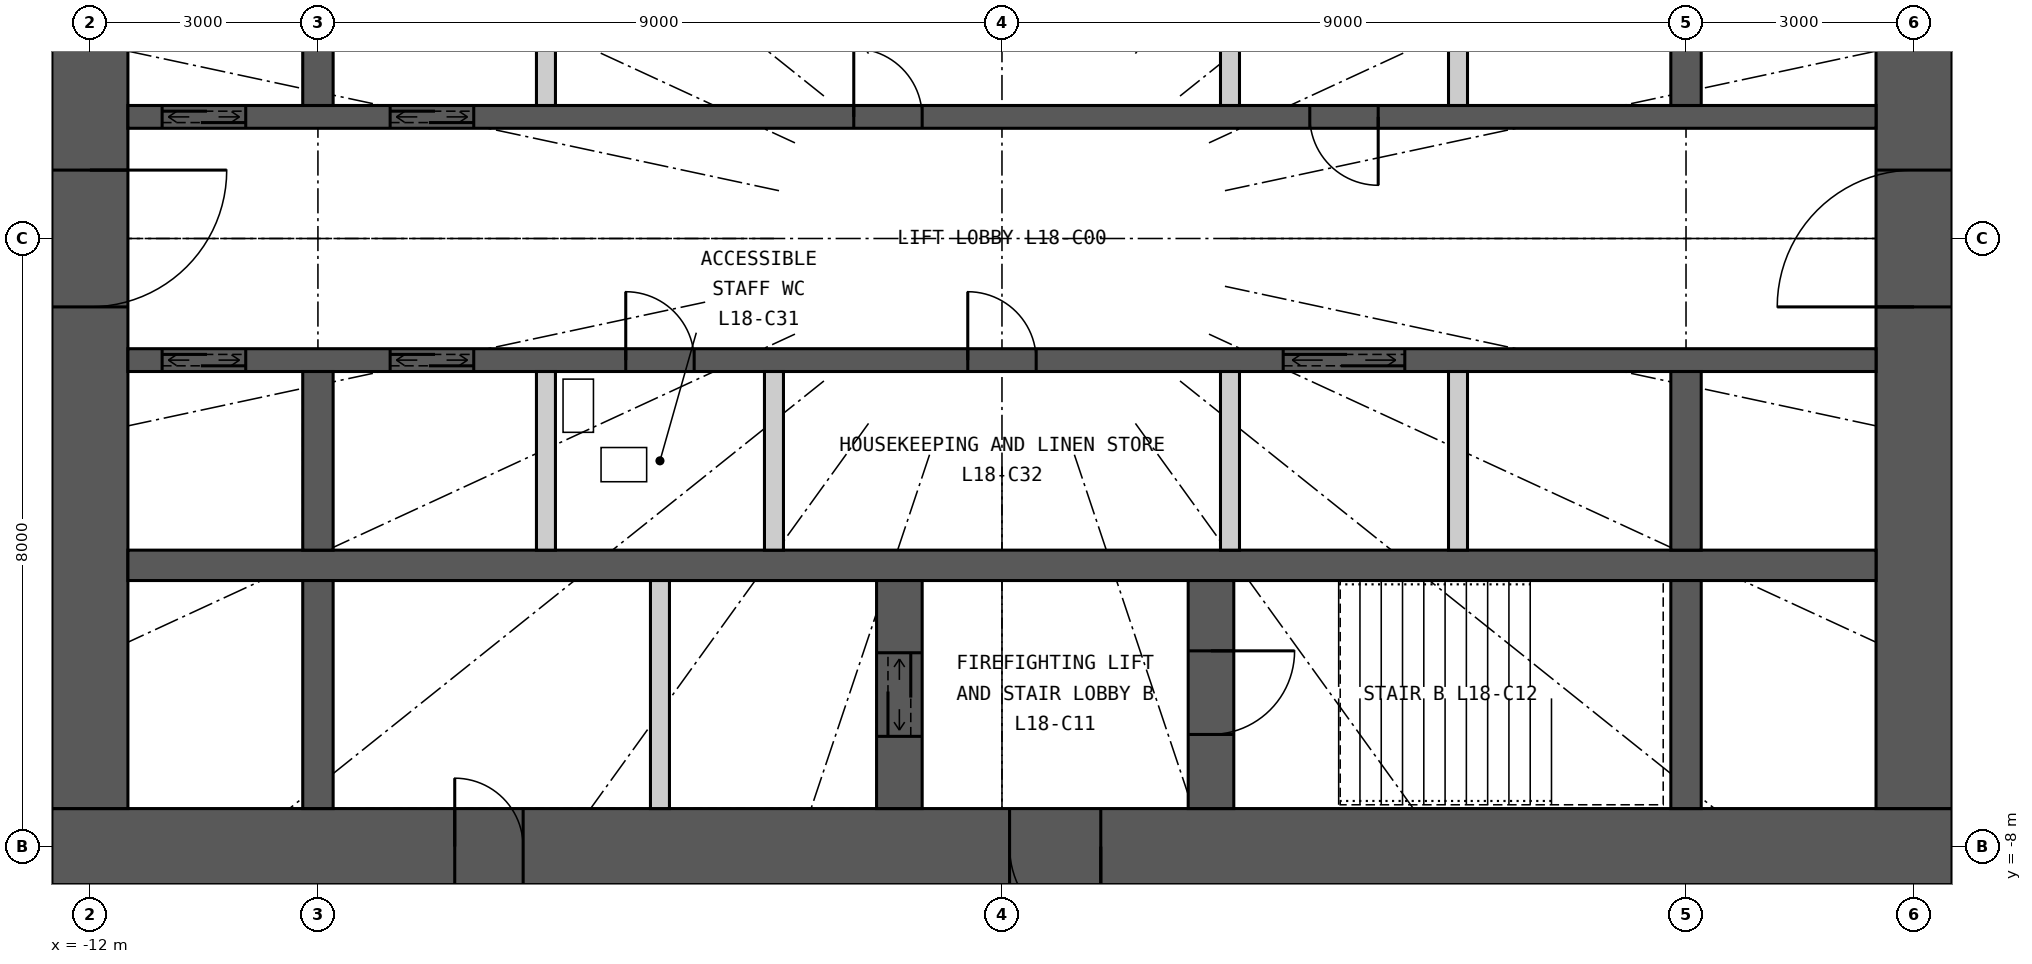
"""IFC4 building model, lengths in metres.
Left out: names, types, materials, properties, quantities, classifications, styles, units other than length and angle.
Written with IfcOpenShell. Run it as: python <this file> out.ifc"""

import sys

from ifc_helpers import new_model, si_unit, direction, frame, frame_2d, origin, place, context, subcontext, project, spatial, rectangle, extrude, element, fill, save


model = new_model("IFC4")
c1 = context("Model", 3, precision=1e-05, world=origin(), true_north=direction((0.0, 1.0)))
c2 = subcontext(c1, "Body", "Model", "MODEL_VIEW")
j1 = project(units=[si_unit("LENGTHUNIT", "METRE"), si_unit("PLANEANGLEUNIT", "RADIAN")], contexts=[c1])
p1 = place(None, origin())
s1 = spatial("IfcSite", under=j1, at=p1, CompositionType="ELEMENT")
p2 = place(p1, origin())
s2 = spatial("IfcBuilding", under=s1, at=p2, CompositionType="ELEMENT")
p3 = place(p2, frame((0.0, 0.0, 73.8)))
s3 = spatial("IfcBuildingStorey", under=s2, at=p3, CompositionType="ELEMENT", Elevation=73.8)
p4 = place(p3, frame((12.5, -8.0, 0.0), z_axis=(0.0, 0.0, 1.0), x_axis=(-1.0, 0.0, 0.0)))
e1 = element("IfcWall", 1, at=p4, inside=s3, PredefinedType="SHEAR", context=c2, shape_type="SweptSolid", body=[
    extrude(rectangle(XDim=25.0, YDim=1.0, at=frame_2d((12.5, 0.0))), origin(), (0.0, 0.0, 1.0), 3.3),
])
p5 = place(p4, frame((11.2, 0.0, 0.0)))
e2 = element("IfcOpeningElement", 2, at=p5, cuts=e1, PredefinedType="OPENING", context=c2, shape_type="SweptSolid", body=[
    extrude(rectangle(XDim=1.2, YDim=2.2, at=frame_2d((0.6, 1.1))), frame((0.0, 0.51, 0.0), z_axis=(0.0, -1.0, 0.0), x_axis=(1.0, 0.0, 0.0)), (0.0, 0.0, 1.0), 1.02),
])
p6 = place(p4, frame((18.8, 0.0, 0.0)))
e3 = element("IfcOpeningElement", 3, at=p6, cuts=e1, PredefinedType="OPENING", context=c2, shape_type="SweptSolid", body=[
    extrude(rectangle(XDim=0.9, YDim=2.2, at=frame_2d((0.45, 1.1))), frame((0.0, 0.51, 0.0), z_axis=(0.0, -1.0, 0.0), x_axis=(1.0, 0.0, 0.0)), (0.0, 0.0, 1.0), 1.02),
])
p7 = place(p3, frame((12.0, -7.5, 0.0), z_axis=(0.0, 0.0, 1.0), x_axis=(0.0, 1.0, 0.0)))
e4 = element("IfcWall", 4, at=p7, inside=s3, PredefinedType="SHEAR", context=c2, shape_type="SweptSolid", body=[
    extrude(rectangle(XDim=15.0, YDim=1.0, at=frame_2d((7.5, 0.0))), origin(), (0.0, 0.0, 1.0), 3.3),
])
p8 = place(p7, frame((6.6, 0.0, 0.0)))
e5 = element("IfcOpeningElement", 5, at=p8, cuts=e4, PredefinedType="OPENING", context=c2, shape_type="SweptSolid", body=[
    extrude(rectangle(XDim=1.8, YDim=2.2, at=frame_2d((0.9, 1.1))), frame((0.0, 0.51, 0.0), z_axis=(0.0, -1.0, 0.0), x_axis=(1.0, 0.0, 0.0)), (0.0, 0.0, 1.0), 1.02),
])
p9 = place(p3, frame((-12.0, 7.5, 0.0), z_axis=(0.0, 0.0, 1.0), x_axis=(0.0, -1.0, 0.0)))
e6 = element("IfcWall", 6, at=p9, inside=s3, PredefinedType="SHEAR", context=c2, shape_type="SweptSolid", body=[
    extrude(rectangle(XDim=15.0, YDim=1.0, at=frame_2d((7.5, 0.0))), origin(), (0.0, 0.0, 1.0), 3.3),
])
p10 = place(p9, frame((6.6, 0.0, 0.0)))
e7 = element("IfcOpeningElement", 7, at=p10, cuts=e6, PredefinedType="OPENING", context=c2, shape_type="SweptSolid", body=[
    extrude(rectangle(XDim=1.8, YDim=2.2, at=frame_2d((0.9, 1.1))), frame((0.0, 0.51, 0.0), z_axis=(0.0, -1.0, 0.0), x_axis=(1.0, 0.0, 0.0)), (0.0, 0.0, 1.0), 1.02),
])
p11 = place(p3, frame((-11.5, 1.6, 0.0), z_axis=(0.0, 0.0, 1.0), x_axis=(1.0, 0.0, 0.0)))
e8 = element("IfcWall", 8, at=p11, inside=s3, PredefinedType="SHEAR", context=c2, shape_type="SweptSolid", body=[
    extrude(rectangle(XDim=23.0, YDim=0.3, at=frame_2d((11.5, 0.0))), origin(), (0.0, 0.0, 1.0), 3.3),
])
p12 = place(p11, frame((0.45, 0.0, 0.0)))
e9 = element("IfcOpeningElement", 9, at=p12, cuts=e8, PredefinedType="OPENING", context=c2, shape_type="SweptSolid", body=[
    extrude(rectangle(XDim=1.1, YDim=2.2, at=frame_2d((0.55, 1.1))), frame((0.0, 0.16, 0.0), z_axis=(0.0, -1.0, 0.0), x_axis=(1.0, 0.0, 0.0)), (0.0, 0.0, 1.0), 0.32),
])
p13 = place(p11, frame((3.45, 0.0, 0.0)))
e10 = element("IfcOpeningElement", 10, at=p13, cuts=e8, PredefinedType="OPENING", context=c2, shape_type="SweptSolid", body=[
    extrude(rectangle(XDim=1.1, YDim=2.2, at=frame_2d((0.55, 1.1))), frame((0.0, 0.16, 0.0), z_axis=(0.0, -1.0, 0.0), x_axis=(1.0, 0.0, 0.0)), (0.0, 0.0, 1.0), 0.32),
])
p14 = place(p11, frame((9.55, 0.0, 0.0)))
e11 = element("IfcOpeningElement", 11, at=p14, cuts=e8, PredefinedType="OPENING", context=c2, shape_type="SweptSolid", body=[
    extrude(rectangle(XDim=0.9, YDim=2.2, at=frame_2d((0.45, 1.1))), frame((0.0, 0.16, 0.0), z_axis=(0.0, -1.0, 0.0), x_axis=(1.0, 0.0, 0.0)), (0.0, 0.0, 1.0), 0.32),
])
p15 = place(p11, frame((15.55, 0.0, 0.0)))
e12 = element("IfcOpeningElement", 12, at=p15, cuts=e8, PredefinedType="OPENING", context=c2, shape_type="SweptSolid", body=[
    extrude(rectangle(XDim=0.9, YDim=2.2, at=frame_2d((0.45, 1.1))), frame((0.0, 0.16, 0.0), z_axis=(0.0, -1.0, 0.0), x_axis=(1.0, 0.0, 0.0)), (0.0, 0.0, 1.0), 0.32),
])
p16 = place(p3, frame((-11.5, -4.3, 0.0), z_axis=(0.0, 0.0, 1.0), x_axis=(1.0, 0.0, 0.0)))
e13 = element("IfcWall", 13, at=p16, inside=s3, PredefinedType="SHEAR", context=c2, shape_type="SweptSolid", body=[
    extrude(rectangle(XDim=23.0, YDim=0.4, at=frame_2d((11.5, 0.0))), origin(), (0.0, 0.0, 1.0), 3.3),
])
p17 = place(p3, frame((-11.5, -1.6, 0.0), z_axis=(0.0, 0.0, 1.0), x_axis=(1.0, 0.0, 0.0)))
e14 = element("IfcWall", 14, at=p17, inside=s3, PredefinedType="SHEAR", context=c2, shape_type="SweptSolid", body=[
    extrude(rectangle(XDim=23.0, YDim=0.3, at=frame_2d((11.5, 0.0))), origin(), (0.0, 0.0, 1.0), 3.3),
])
p18 = place(p17, frame((0.45, 0.0, 0.0)))
e15 = element("IfcOpeningElement", 15, at=p18, cuts=e14, PredefinedType="OPENING", context=c2, shape_type="SweptSolid", body=[
    extrude(rectangle(XDim=1.1, YDim=2.2, at=frame_2d((0.55, 1.1))), frame((0.0, 0.16, 0.0), z_axis=(0.0, -1.0, 0.0), x_axis=(1.0, 0.0, 0.0)), (0.0, 0.0, 1.0), 0.32),
])
p19 = place(p17, frame((3.45, 0.0, 0.0)))
e16 = element("IfcOpeningElement", 16, at=p19, cuts=e14, PredefinedType="OPENING", context=c2, shape_type="SweptSolid", body=[
    extrude(rectangle(XDim=1.1, YDim=2.2, at=frame_2d((0.55, 1.1))), frame((0.0, 0.16, 0.0), z_axis=(0.0, -1.0, 0.0), x_axis=(1.0, 0.0, 0.0)), (0.0, 0.0, 1.0), 0.32),
])
p20 = place(p17, frame((15.2, 0.0, 0.0)))
e17 = element("IfcOpeningElement", 17, at=p20, cuts=e14, PredefinedType="OPENING", context=c2, shape_type="SweptSolid", body=[
    extrude(rectangle(XDim=1.6, YDim=2.4, at=frame_2d((0.8, 1.2))), frame((0.0, 0.16, 0.0), z_axis=(0.0, -1.0, 0.0), x_axis=(1.0, 0.0, 0.0)), (0.0, 0.0, 1.0), 0.32),
])
p21 = place(p17, frame((6.55, 0.0, 0.0)))
e18 = element("IfcOpeningElement", 18, at=p21, cuts=e14, PredefinedType="OPENING", context=c2, shape_type="SweptSolid", body=[
    extrude(rectangle(XDim=0.9, YDim=2.2, at=frame_2d((0.45, 1.1))), frame((0.0, 0.16, 0.0), z_axis=(0.0, -1.0, 0.0), x_axis=(1.0, 0.0, 0.0)), (0.0, 0.0, 1.0), 0.32),
])
p22 = place(p17, frame((11.05, 0.0, 0.0)))
e19 = element("IfcOpeningElement", 19, at=p22, cuts=e14, PredefinedType="OPENING", context=c2, shape_type="SweptSolid", body=[
    extrude(rectangle(XDim=0.9, YDim=2.2, at=frame_2d((0.45, 1.1))), frame((0.0, 0.16, 0.0), z_axis=(0.0, -1.0, 0.0), x_axis=(1.0, 0.0, 0.0)), (0.0, 0.0, 1.0), 0.32),
])
for number, where, z_axis, x_axis in (
    (20, (-9.0, 1.75, 0.0), (0.0, 0.0, 1.0), (0.0, 1.0, 0.0)),
    (21, (-9.0, -4.1, 0.0), (0.0, 0.0, 1.0), (0.0, 1.0, 0.0)),
):
    element("IfcWall", number, at=place(p3, frame(where, z_axis=z_axis, x_axis=x_axis)), inside=s3, PredefinedType="SHEAR", context=c2, shape_type="SweptSolid", body=[
        extrude(rectangle(XDim=2.35, YDim=0.4, at=frame_2d((1.175, 0.0))), origin(), (0.0, 0.0, 1.0), 3.3),
    ])
p23 = place(p3, frame((-9.0, -7.5, 0.0), z_axis=(0.0, 0.0, 1.0), x_axis=(0.0, 1.0, 0.0)))
e22 = element("IfcWall", 22, at=p23, inside=s3, PredefinedType="SHEAR", context=c2, shape_type="SweptSolid", body=[
    extrude(rectangle(XDim=3.0, YDim=0.4, at=frame_2d((1.5, 0.0))), origin(), (0.0, 0.0, 1.0), 3.3),
])
for number, where, z_axis, x_axis in (
    (23, (9.0, 1.75, 0.0), (0.0, 0.0, 1.0), (0.0, 1.0, 0.0)),
    (24, (9.0, -4.1, 0.0), (0.0, 0.0, 1.0), (0.0, 1.0, 0.0)),
):
    element("IfcWall", number, at=place(p3, frame(where, z_axis=z_axis, x_axis=x_axis)), inside=s3, PredefinedType="SHEAR", context=c2, shape_type="SweptSolid", body=[
        extrude(rectangle(XDim=2.35, YDim=0.4, at=frame_2d((1.175, 0.0))), origin(), (0.0, 0.0, 1.0), 3.3),
    ])
p24 = place(p3, frame((9.0, -7.5, 0.0), z_axis=(0.0, 0.0, 1.0), x_axis=(0.0, 1.0, 0.0)))
e25 = element("IfcWall", 25, at=p24, inside=s3, PredefinedType="SHEAR", context=c2, shape_type="SweptSolid", body=[
    extrude(rectangle(XDim=3.0, YDim=0.4, at=frame_2d((1.5, 0.0))), origin(), (0.0, 0.0, 1.0), 3.3),
])
p25 = place(p3, frame((2.75, -7.5, 0.0), z_axis=(0.0, 0.0, 1.0), x_axis=(0.0, 1.0, 0.0)))
e26 = element("IfcWall", 26, at=p25, inside=s3, PredefinedType="SHEAR", context=c2, shape_type="SweptSolid", body=[
    extrude(rectangle(XDim=3.0, YDim=0.6, at=frame_2d((1.5, 0.0))), origin(), (0.0, 0.0, 1.0), 3.3),
])
p26 = place(p25, frame((0.975, 0.0, 0.0)))
e27 = element("IfcOpeningElement", 27, at=p26, cuts=e26, PredefinedType="OPENING", context=c2, shape_type="SweptSolid", body=[
    extrude(rectangle(XDim=1.1, YDim=2.2, at=frame_2d((0.55, 1.1))), frame((0.0, 0.31, 0.0), z_axis=(0.0, -1.0, 0.0), x_axis=(1.0, 0.0, 0.0)), (0.0, 0.0, 1.0), 0.62),
])
p27 = place(p3, frame((-1.35, -7.5, 0.0), z_axis=(0.0, 0.0, 1.0), x_axis=(0.0, 1.0, 0.0)))
e28 = element("IfcWall", 28, at=p27, inside=s3, PredefinedType="SHEAR", context=c2, shape_type="SweptSolid", body=[
    extrude(rectangle(XDim=3.0, YDim=0.6, at=frame_2d((1.5, 0.0))), origin(), (0.0, 0.0, 1.0), 3.3),
])
p28 = place(p27, frame((0.95, 0.0, 0.0)))
e29 = element("IfcOpeningElement", 29, at=p28, cuts=e28, PredefinedType="OPENING", context=c2, shape_type="SweptSolid", body=[
    extrude(rectangle(XDim=1.1, YDim=2.2, at=frame_2d((0.55, 1.1))), frame((0.0, 0.31, 0.0), z_axis=(0.0, -1.0, 0.0), x_axis=(1.0, 0.0, 0.0)), (0.0, 0.0, 1.0), 0.62),
])
p29 = place(p3, frame((-4.5, -7.5, 0.0), z_axis=(0.0, 0.0, 1.0), x_axis=(0.0, 1.0, 0.0)))
e30 = element("IfcWall", 30, at=p29, inside=s3, PredefinedType="PARTITIONING", context=c2, shape_type="SweptSolid", body=[
    extrude(rectangle(XDim=3.0, YDim=0.25, at=frame_2d((1.5, 0.0))), origin(), (0.0, 0.0, 1.0), 3.3),
])
for number, where, z_axis, x_axis in (
    (31, (-6.0, 1.75, 0.0), (0.0, 0.0, 1.0), (0.0, 1.0, 0.0)),
    (32, (3.0, 1.75, 0.0), (0.0, 0.0, 1.0), (0.0, 1.0, 0.0)),
    (33, (6.0, 1.75, 0.0), (0.0, 0.0, 1.0), (0.0, 1.0, 0.0)),
    (34, (-6.0, -4.1, 0.0), (0.0, 0.0, 1.0), (0.0, 1.0, 0.0)),
    (35, (-3.0, -4.1, 0.0), (0.0, 0.0, 1.0), (0.0, 1.0, 0.0)),
    (36, (3.0, -4.1, 0.0), (0.0, 0.0, 1.0), (0.0, 1.0, 0.0)),
    (37, (6.0, -4.1, 0.0), (0.0, 0.0, 1.0), (0.0, 1.0, 0.0)),
):
    element("IfcWall", number, at=place(p3, frame(where, z_axis=z_axis, x_axis=x_axis)), inside=s3, PredefinedType="PARTITIONING", context=c2, shape_type="SweptSolid", body=[
        extrude(rectangle(XDim=2.35, YDim=0.25, at=frame_2d((1.175, 0.0))), origin(), (0.0, 0.0, 1.0), 3.3),
    ])
p30 = place(p5, origin())
e38 = element("IfcDoor", 38, at=p30, inside=s3, OperationType="SINGLE_SWING_LEFT", PredefinedType="DOOR", context=c2, shape_type="SweptSolid", body=[
    extrude(rectangle(XDim=1.2, YDim=2.2, at=frame_2d((0.6, 1.1))), frame((0.0, 0.025, 0.0), z_axis=(0.0, -1.0, 0.0), x_axis=(1.0, 0.0, 0.0)), (0.0, 0.0, 1.0), 0.05),
])
fill(e2, e38)
p31 = place(p26, origin())
e39 = element("IfcDoor", 39, at=p31, inside=s3, OperationType="SINGLE_SWING_RIGHT", PredefinedType="DOOR", context=c2, shape_type="SweptSolid", body=[
    extrude(rectangle(XDim=1.1, YDim=2.2, at=frame_2d((0.55, 1.1))), frame((0.0, 0.025, 0.0), z_axis=(0.0, -1.0, 0.0), x_axis=(1.0, 0.0, 0.0)), (0.0, 0.0, 1.0), 0.05),
])
fill(e27, e39)
p32 = place(p28, origin())
e40 = element("IfcDoor", 40, at=p32, inside=s3, OperationType="DOUBLE_DOOR_SLIDING", PredefinedType="DOOR", context=c2, shape_type="SweptSolid", body=[
    extrude(rectangle(XDim=1.1, YDim=2.2, at=frame_2d((0.55, 1.1))), frame((0.0, 0.025, 0.0), z_axis=(0.0, -1.0, 0.0), x_axis=(1.0, 0.0, 0.0)), (0.0, 0.0, 1.0), 0.05),
])
fill(e29, e40)
p33 = place(p6, origin())
e41 = element("IfcDoor", 41, at=p33, inside=s3, OperationType="SINGLE_SWING_RIGHT", PredefinedType="DOOR", context=c2, shape_type="SweptSolid", body=[
    extrude(rectangle(XDim=0.9, YDim=2.2, at=frame_2d((0.45, 1.1))), frame((0.0, 0.025, 0.0), z_axis=(0.0, -1.0, 0.0), x_axis=(1.0, 0.0, 0.0)), (0.0, 0.0, 1.0), 0.05),
])
fill(e3, e41)
p34 = place(p12, origin())
e42 = element("IfcDoor", 42, at=p34, inside=s3, OperationType="DOUBLE_DOOR_SLIDING", PredefinedType="DOOR", context=c2, shape_type="SweptSolid", body=[
    extrude(rectangle(XDim=1.1, YDim=2.2, at=frame_2d((0.55, 1.1))), frame((0.0, 0.025, 0.0), z_axis=(0.0, -1.0, 0.0), x_axis=(1.0, 0.0, 0.0)), (0.0, 0.0, 1.0), 0.05),
])
fill(e9, e42)
p35 = place(p13, origin())
e43 = element("IfcDoor", 43, at=p35, inside=s3, OperationType="DOUBLE_DOOR_SLIDING", PredefinedType="DOOR", context=c2, shape_type="SweptSolid", body=[
    extrude(rectangle(XDim=1.1, YDim=2.2, at=frame_2d((0.55, 1.1))), frame((0.0, 0.025, 0.0), z_axis=(0.0, -1.0, 0.0), x_axis=(1.0, 0.0, 0.0)), (0.0, 0.0, 1.0), 0.05),
])
fill(e10, e43)
p36 = place(p18, origin())
e44 = element("IfcDoor", 44, at=p36, inside=s3, OperationType="DOUBLE_DOOR_SLIDING", PredefinedType="DOOR", context=c2, shape_type="SweptSolid", body=[
    extrude(rectangle(XDim=1.1, YDim=2.2, at=frame_2d((0.55, 1.1))), frame((0.0, 0.025, 0.0), z_axis=(0.0, -1.0, 0.0), x_axis=(1.0, 0.0, 0.0)), (0.0, 0.0, 1.0), 0.05),
])
fill(e15, e44)
p37 = place(p19, origin())
e45 = element("IfcDoor", 45, at=p37, inside=s3, OperationType="DOUBLE_DOOR_SLIDING", PredefinedType="DOOR", context=c2, shape_type="SweptSolid", body=[
    extrude(rectangle(XDim=1.1, YDim=2.2, at=frame_2d((0.55, 1.1))), frame((0.0, 0.025, 0.0), z_axis=(0.0, -1.0, 0.0), x_axis=(1.0, 0.0, 0.0)), (0.0, 0.0, 1.0), 0.05),
])
fill(e16, e45)
p38 = place(p20, origin())
e46 = element("IfcDoor", 46, at=p38, inside=s3, OperationType="DOUBLE_DOOR_SLIDING", PredefinedType="DOOR", context=c2, shape_type="SweptSolid", body=[
    extrude(rectangle(XDim=1.6, YDim=2.4, at=frame_2d((0.8, 1.2))), frame((0.0, 0.025, 0.0), z_axis=(0.0, -1.0, 0.0), x_axis=(1.0, 0.0, 0.0)), (0.0, 0.0, 1.0), 0.05),
])
fill(e17, e46)
p39 = place(p14, origin())
e47 = element("IfcDoor", 47, at=p39, inside=s3, OperationType="SINGLE_SWING_LEFT", PredefinedType="DOOR", context=c2, shape_type="SweptSolid", body=[
    extrude(rectangle(XDim=0.9, YDim=2.2, at=frame_2d((0.45, 1.1))), frame((0.0, 0.025, 0.0), z_axis=(0.0, -1.0, 0.0), x_axis=(1.0, 0.0, 0.0)), (0.0, 0.0, 1.0), 0.05),
])
fill(e11, e47)
p40 = place(p15, origin())
e48 = element("IfcDoor", 48, at=p40, inside=s3, OperationType="SINGLE_SWING_RIGHT", PredefinedType="DOOR", context=c2, shape_type="SweptSolid", body=[
    extrude(rectangle(XDim=0.9, YDim=2.2, at=frame_2d((0.45, 1.1))), frame((0.0, 0.025, 0.0), z_axis=(0.0, -1.0, 0.0), x_axis=(1.0, 0.0, 0.0)), (0.0, 0.0, 1.0), 0.05),
])
fill(e12, e48)
p41 = place(p21, origin())
e49 = element("IfcDoor", 49, at=p41, inside=s3, OperationType="SINGLE_SWING_LEFT", PredefinedType="DOOR", context=c2, shape_type="SweptSolid", body=[
    extrude(rectangle(XDim=0.9, YDim=2.2, at=frame_2d((0.45, 1.1))), frame((0.0, 0.025, 0.0), z_axis=(0.0, -1.0, 0.0), x_axis=(1.0, 0.0, 0.0)), (0.0, 0.0, 1.0), 0.05),
])
fill(e18, e49)
p42 = place(p22, origin())
e50 = element("IfcDoor", 50, at=p42, inside=s3, OperationType="SINGLE_SWING_LEFT", PredefinedType="DOOR", context=c2, shape_type="SweptSolid", body=[
    extrude(rectangle(XDim=0.9, YDim=2.2, at=frame_2d((0.45, 1.1))), frame((0.0, 0.025, 0.0), z_axis=(0.0, -1.0, 0.0), x_axis=(1.0, 0.0, 0.0)), (0.0, 0.0, 1.0), 0.05),
])
fill(e19, e50)
p43 = place(p8, origin())
e51 = element("IfcDoor", 51, at=p43, inside=s3, OperationType="DOUBLE_DOOR_DOUBLE_SWING", PredefinedType="DOOR", context=c2, shape_type="SweptSolid", body=[
    extrude(rectangle(XDim=1.8, YDim=2.2, at=frame_2d((0.9, 1.1))), frame((0.0, 0.025, 0.0), z_axis=(0.0, -1.0, 0.0), x_axis=(1.0, 0.0, 0.0)), (0.0, 0.0, 1.0), 0.05),
])
fill(e5, e51)
p44 = place(p10, origin())
e52 = element("IfcDoor", 52, at=p44, inside=s3, OperationType="DOUBLE_DOOR_DOUBLE_SWING", PredefinedType="DOOR", context=c2, shape_type="SweptSolid", body=[
    extrude(rectangle(XDim=1.8, YDim=2.2, at=frame_2d((0.9, 1.1))), frame((0.0, 0.025, 0.0), z_axis=(0.0, -1.0, 0.0), x_axis=(1.0, 0.0, 0.0)), (0.0, 0.0, 1.0), 0.05),
])
fill(e7, e52)
save(model, sys.argv[1])
